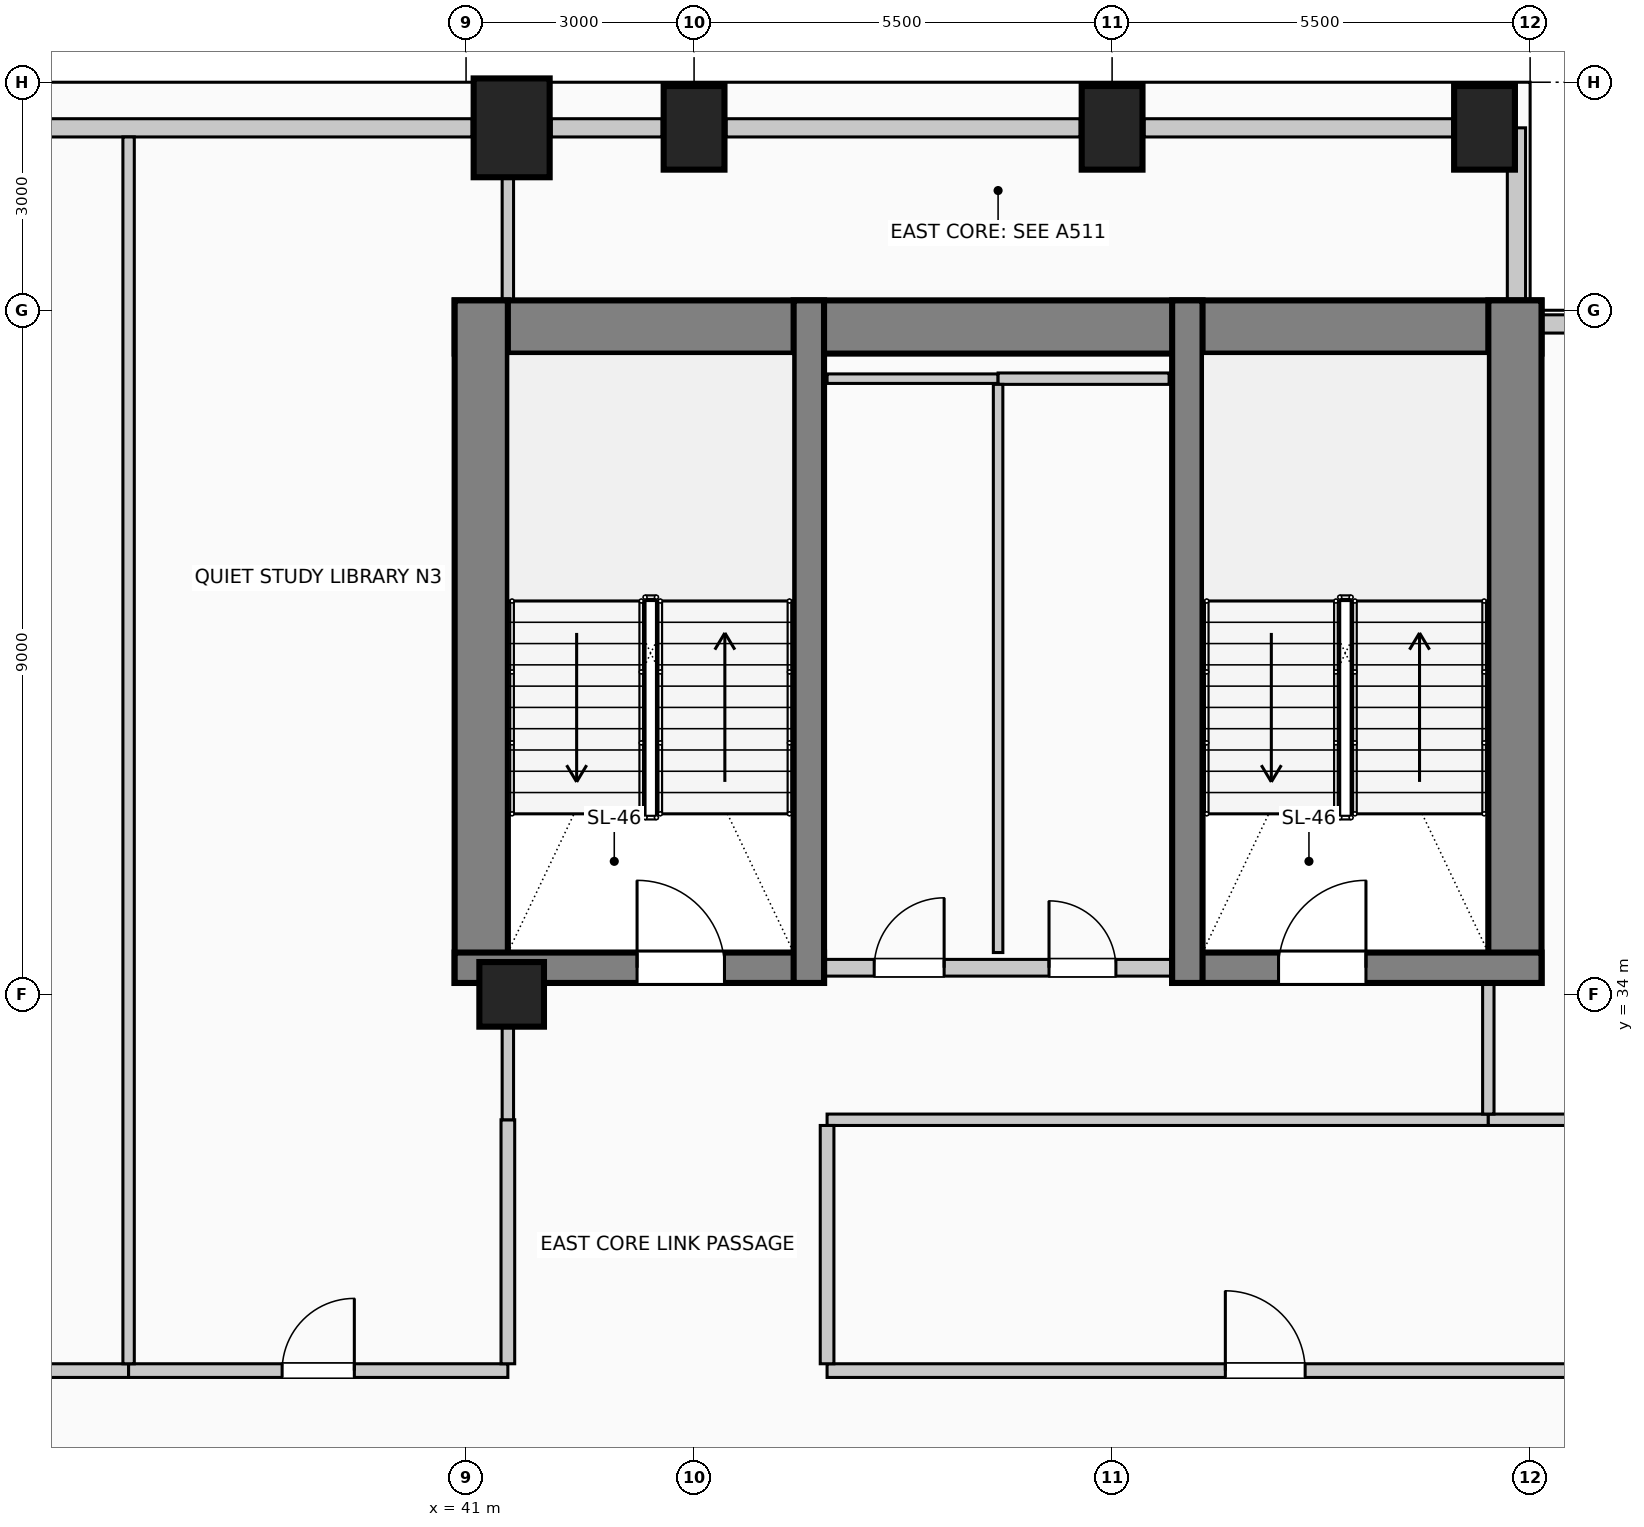
"""IFC4 building model, lengths in metres.
Left out: names, types, materials, properties, quantities, classifications, styles, units other than length and angle.
Written with IfcOpenShell. Run it as: python <this file> out.ifc"""

import sys

from ifc_helpers import new_model, si_unit, direction, frame, frame_2d, origin, origin_2d, place, context, subcontext, project, spatial, rectangle, circle, extrude, element, fill, save


model = new_model("IFC4")
c1 = context("Model", 3, precision=1e-05, world=origin(), true_north=direction((0.0, 1.0)))
c2 = subcontext(c1, "Body", "Model", "MODEL_VIEW")
j1 = project(units=[si_unit("LENGTHUNIT", "METRE"), si_unit("PLANEANGLEUNIT", "RADIAN")], contexts=[c1])
p1 = place(None, origin())
s1 = spatial("IfcSite", under=j1, at=p1, CompositionType="ELEMENT")
p2 = place(p1, origin())
s2 = spatial("IfcBuilding", under=s1, at=p2, CompositionType="ELEMENT")
p3 = place(p2, frame((0.0, 0.0, 218.6)))
s3 = spatial("IfcBuildingStorey", under=s2, at=p3, CompositionType="ELEMENT", Elevation=218.6)
p4 = place(p3, frame((40.85, 42.78, 0.0), z_axis=(0.0, 0.0, 1.0), x_axis=(1.0, 0.0, 0.0)))
e1 = element("IfcWall", 1, at=p4, inside=s3, PredefinedType="SHEAR", context=c2, shape_type="SweptSolid", body=[
    extrude(rectangle(XDim=14.3, YDim=0.7, at=frame_2d((7.15, 0.0))), origin(), (0.0, 0.0, 1.0), 4.0),
])
for number, where, z_axis, x_axis in (
    (2, (41.2, 34.15, 0.0), (0.0, 0.0, 1.0), (0.0, 1.0, 0.0)),
    (3, (54.8, 34.15, 0.0), (0.0, 0.0, 1.0), (0.0, 1.0, 0.0)),
):
    element("IfcWall", number, at=place(p3, frame(where, z_axis=z_axis, x_axis=x_axis)), inside=s3, PredefinedType="SHEAR", context=c2, shape_type="SweptSolid", body=[
        extrude(rectangle(XDim=8.98, YDim=0.7, at=frame_2d((4.49, 0.0))), origin(), (0.0, 0.0, 1.0), 4.0),
    ])
p5 = place(p3, frame((40.85, 34.35, 0.0), z_axis=(0.0, 0.0, 1.0), x_axis=(1.0, 0.0, 0.0)))
e4 = element("IfcWall", 4, at=p5, inside=s3, PredefinedType="SHEAR", context=c2, shape_type="SweptSolid", body=[
    extrude(rectangle(XDim=4.86, YDim=0.4, at=frame_2d((2.43, 0.0))), origin(), (0.0, 0.0, 1.0), 4.0),
])
p6 = place(p5, frame((2.4, 0.0, 0.0)))
e5 = element("IfcOpeningElement", 5, at=p6, cuts=e4, PredefinedType="OPENING", context=c2, shape_type="SweptSolid", body=[
    extrude(rectangle(XDim=1.15, YDim=2.2, at=frame_2d((0.575, 1.1))), frame((0.0, 0.21, 0.0), z_axis=(0.0, -1.0, 0.0), x_axis=(1.0, 0.0, 0.0)), (0.0, 0.0, 1.0), 0.42),
])
p7 = place(p3, frame((45.51, 34.15, 0.0), z_axis=(0.0, 0.0, 1.0), x_axis=(0.0, 1.0, 0.0)))
e6 = element("IfcWall", 6, at=p7, inside=s3, PredefinedType="SHEAR", context=c2, shape_type="SweptSolid", body=[
    extrude(rectangle(XDim=8.98, YDim=0.4, at=frame_2d((4.49, 0.0))), origin(), (0.0, 0.0, 1.0), 4.0),
])
p8 = place(p3, frame((50.29, 34.35, 0.0), z_axis=(0.0, 0.0, 1.0), x_axis=(1.0, 0.0, 0.0)))
e7 = element("IfcWall", 7, at=p8, inside=s3, PredefinedType="SHEAR", context=c2, shape_type="SweptSolid", body=[
    extrude(rectangle(XDim=4.86, YDim=0.4, at=frame_2d((2.43, 0.0))), origin(), (0.0, 0.0, 1.0), 4.0),
])
p9 = place(p8, frame((1.4, 0.0, 0.0)))
e8 = element("IfcOpeningElement", 8, at=p9, cuts=e7, PredefinedType="OPENING", context=c2, shape_type="SweptSolid", body=[
    extrude(rectangle(XDim=1.15, YDim=2.2, at=frame_2d((0.575, 1.1))), frame((0.0, 0.21, 0.0), z_axis=(0.0, -1.0, 0.0), x_axis=(1.0, 0.0, 0.0)), (0.0, 0.0, 1.0), 0.42),
])
p10 = place(p3, frame((50.49, 34.15, 0.0), z_axis=(0.0, 0.0, 1.0), x_axis=(0.0, 1.0, 0.0)))
e9 = element("IfcWall", 9, at=p10, inside=s3, PredefinedType="SHEAR", context=c2, shape_type="SweptSolid", body=[
    extrude(rectangle(XDim=8.98, YDim=0.4, at=frame_2d((4.49, 0.0))), origin(), (0.0, 0.0, 1.0), 4.0),
])
p11 = place(p3, frame((41.6, 45.4, 0.0), z_axis=(0.0, 0.0, 1.0), x_axis=(1.0, 0.0, 0.0)))
e10 = element("IfcColumn", 10, at=p11, inside=s3, PredefinedType="COLUMN", context=c2, shape_type="SweptSolid", body=[
    extrude(rectangle(XDim=1.0, YDim=1.3, at=origin_2d()), origin(), (0.0, 0.0, 1.0), 4.0),
])
for number, where, z_axis, x_axis in (
    (11, (44.0, 45.4, 0.0), (0.0, 0.0, 1.0), (1.0, 0.0, 0.0)),
    (12, (49.5, 45.4, 0.0), (0.0, 0.0, 1.0), (1.0, 0.0, 0.0)),
    (13, (54.4, 45.4, 0.0), (0.0, 0.0, 1.0), (1.0, 0.0, 0.0)),
):
    element("IfcColumn", number, at=place(p3, frame(where, z_axis=z_axis, x_axis=x_axis)), inside=s3, PredefinedType="COLUMN", context=c2, shape_type="SweptSolid", body=[
        extrude(rectangle(XDim=0.8, YDim=1.1, at=origin_2d()), origin(), (0.0, 0.0, 1.0), 4.0),
    ])
p12 = place(p3, frame((41.6, 34.0, 0.0), z_axis=(0.0, 0.0, 1.0), x_axis=(1.0, 0.0, 0.0)))
e14 = element("IfcColumn", 14, at=p12, inside=s3, PredefinedType="COLUMN", context=c2, shape_type="SweptSolid", body=[
    extrude(circle(Radius=0.425, at=origin_2d()), origin(), (0.0, 0.0, 1.0), 4.0),
])
p13 = place(p3, frame((34.52, 45.4, 0.0), z_axis=(0.0, 0.0, 1.0), x_axis=(1.0, 0.0, 0.0)))
e15 = element("IfcWall", 15, at=p13, inside=s3, PredefinedType="SOLIDWALL", context=c2, shape_type="SweptSolid", body=[
    extrude(rectangle(XDim=6.56, YDim=0.24, at=frame_2d((3.28, 0.0))), origin(), (0.0, 0.0, 1.0), 3.0),
])
p14 = place(p3, frame((42.12, 45.4, 0.0), z_axis=(0.0, 0.0, 1.0), x_axis=(1.0, 0.0, 0.0)))
e16 = element("IfcWall", 16, at=p14, inside=s3, PredefinedType="SOLIDWALL", context=c2, shape_type="SweptSolid", body=[
    extrude(rectangle(XDim=1.46, YDim=0.24, at=frame_2d((0.73, 0.0))), origin(), (0.0, 0.0, 1.0), 3.0),
])
p15 = place(p3, frame((44.42, 45.4, 0.0), z_axis=(0.0, 0.0, 1.0), x_axis=(1.0, 0.0, 0.0)))
e17 = element("IfcWall", 17, at=p15, inside=s3, PredefinedType="SOLIDWALL", context=c2, shape_type="SweptSolid", body=[
    extrude(rectangle(XDim=4.66, YDim=0.24, at=frame_2d((2.33, 0.0))), origin(), (0.0, 0.0, 1.0), 3.0),
])
p16 = place(p3, frame((49.92, 45.4, 0.0), z_axis=(0.0, 0.0, 1.0), x_axis=(1.0, 0.0, 0.0)))
e18 = element("IfcWall", 18, at=p16, inside=s3, PredefinedType="SOLIDWALL", context=c2, shape_type="SweptSolid", body=[
    extrude(rectangle(XDim=4.06, YDim=0.24, at=frame_2d((2.03, 0.0))), origin(), (0.0, 0.0, 1.0), 3.0),
])
p17 = place(p3, frame((54.82, 45.4, 0.0), z_axis=(0.0, 0.0, 1.0), x_axis=(0.0, -1.0, 0.0)))
e19 = element("IfcWall", 19, at=p17, inside=s3, PredefinedType="SOLIDWALL", context=c2, shape_type="SweptSolid", body=[
    extrude(rectangle(XDim=2.265, YDim=0.24, at=frame_2d((1.132, 0.0))), origin(), (0.0, 0.0, 1.0), 3.75),
])
p18 = place(p3, frame((55.155, 42.82, 0.0), z_axis=(0.0, 0.0, 1.0), x_axis=(1.0, 0.0, 0.0)))
e20 = element("IfcWall", 20, at=p18, inside=s3, PredefinedType="SOLIDWALL", context=c2, shape_type="SweptSolid", body=[
    extrude(rectangle(XDim=2.245, YDim=0.24, at=frame_2d((1.123, 0.0))), origin(), (0.0, 0.0, 1.0), 3.75),
])
p19 = place(p3, frame((45.72, 34.35, 0.0), z_axis=(0.0, 0.0, 1.0), x_axis=(1.0, 0.0, 0.0)))
e21 = element("IfcWall", 21, at=p19, inside=s3, PredefinedType="PARTITIONING", context=c2, shape_type="SweptSolid", body=[
    extrude(rectangle(XDim=4.56, YDim=0.22, at=frame_2d((2.28, 0.0))), origin(), (0.0, 0.0, 1.0), 3.75),
])
p20 = place(p19, frame((0.65, 0.0, 0.0)))
e22 = element("IfcOpeningElement", 22, at=p20, cuts=e21, PredefinedType="OPENING", context=c2, shape_type="SweptSolid", body=[
    extrude(rectangle(XDim=0.92, YDim=2.1, at=frame_2d((0.46, 1.05))), frame((0.0, 0.12, 0.0), z_axis=(0.0, -1.0, 0.0), x_axis=(1.0, 0.0, 0.0)), (0.0, 0.0, 1.0), 0.24),
])
p21 = place(p19, frame((2.95, 0.0, 0.0)))
e23 = element("IfcOpeningElement", 23, at=p21, cuts=e21, PredefinedType="OPENING", context=c2, shape_type="SweptSolid", body=[
    extrude(rectangle(XDim=0.88, YDim=2.1, at=frame_2d((0.44, 1.05))), frame((0.0, 0.12, 0.0), z_axis=(0.0, -1.0, 0.0), x_axis=(1.0, 0.0, 0.0)), (0.0, 0.0, 1.0), 0.24),
])
p22 = place(p3, frame((28.09, 29.05, 0.0), z_axis=(0.0, 0.0, 1.0), x_axis=(1.0, 0.0, 0.0)))
e24 = element("IfcWall", 24, at=p22, inside=s3, PredefinedType="PARTITIONING", context=c2, shape_type="SweptSolid", body=[
    extrude(rectangle(XDim=8.47, YDim=0.18, at=frame_2d((4.235, 0.0))), origin(), (0.0, 0.0, 1.0), 3.75),
])
p23 = place(p22, frame((3.71, 0.0, 0.0)))
e25 = element("IfcOpeningElement", 25, at=p23, cuts=e24, PredefinedType="OPENING", context=c2, shape_type="SweptSolid", body=[
    extrude(rectangle(XDim=1.05, YDim=2.15, at=frame_2d((0.525, 1.075))), frame((0.0, 0.1, 0.0), z_axis=(0.0, -1.0, 0.0), x_axis=(1.0, 0.0, 0.0)), (0.0, 0.0, 1.0), 0.2),
])
p24 = place(p3, frame((36.56, 29.05, 0.0), z_axis=(0.0, 0.0, 1.0), x_axis=(1.0, 0.0, 0.0)))
e26 = element("IfcWall", 26, at=p24, inside=s3, PredefinedType="PARTITIONING", context=c2, shape_type="SweptSolid", body=[
    extrude(rectangle(XDim=4.99, YDim=0.18, at=frame_2d((2.495, 0.0))), origin(), (0.0, 0.0, 1.0), 3.75),
])
p25 = place(p24, frame((2.02, 0.0, 0.0)))
e27 = element("IfcOpeningElement", 27, at=p25, cuts=e26, PredefinedType="OPENING", context=c2, shape_type="SweptSolid", body=[
    extrude(rectangle(XDim=0.95, YDim=2.15, at=frame_2d((0.475, 1.075))), frame((0.0, 0.1, 0.0), z_axis=(0.0, -1.0, 0.0), x_axis=(1.0, 0.0, 0.0)), (0.0, 0.0, 1.0), 0.2),
])
p26 = place(p3, frame((45.75, 29.05, 0.0), z_axis=(0.0, 0.0, 1.0), x_axis=(1.0, 0.0, 0.0)))
e28 = element("IfcWall", 28, at=p26, inside=s3, PredefinedType="PARTITIONING", context=c2, shape_type="SweptSolid", body=[
    extrude(rectangle(XDim=11.53, YDim=0.18, at=frame_2d((5.765, 0.0))), origin(), (0.0, 0.0, 1.0), 3.75),
])
p27 = place(p26, frame((5.24, 0.0, 0.0)))
e29 = element("IfcOpeningElement", 29, at=p27, cuts=e28, PredefinedType="OPENING", context=c2, shape_type="SweptSolid", body=[
    extrude(rectangle(XDim=1.05, YDim=2.15, at=frame_2d((0.525, 1.075))), frame((0.0, 0.1, 0.0), z_axis=(0.0, -1.0, 0.0), x_axis=(1.0, 0.0, 0.0)), (0.0, 0.0, 1.0), 0.2),
])
p28 = place(p3, frame((45.75, 32.35, 0.0), z_axis=(0.0, 0.0, 1.0), x_axis=(1.0, 0.0, 0.0)))
e30 = element("IfcWall", 30, at=p28, inside=s3, PredefinedType="PARTITIONING", context=c2, shape_type="SweptSolid", body=[
    extrude(rectangle(XDim=8.7, YDim=0.15, at=frame_2d((4.35, 0.0))), origin(), (0.0, 0.0, 1.0), 3.75),
])
p29 = place(p3, frame((54.45, 32.35, 0.0), z_axis=(0.0, 0.0, 1.0), x_axis=(1.0, 0.0, 0.0)))
e31 = element("IfcWall", 31, at=p29, inside=s3, PredefinedType="PARTITIONING", context=c2, shape_type="SweptSolid", body=[
    extrude(rectangle(XDim=2.83, YDim=0.15, at=frame_2d((1.415, 0.0))), origin(), (0.0, 0.0, 1.0), 3.75),
])
p30 = place(p3, frame((45.75, 42.1, 0.0), z_axis=(0.0, 0.0, 1.0), x_axis=(1.0, 0.0, 0.0)))
e32 = element("IfcWall", 32, at=p30, inside=s3, PredefinedType="PARTITIONING", context=c2, shape_type="SweptSolid", body=[
    extrude(rectangle(XDim=2.25, YDim=0.125, at=frame_2d((1.125, 0.0))), origin(), (0.0, 0.0, 1.0), 3.75),
])
p31 = place(p3, frame((48.0, 42.1, 0.0), z_axis=(0.0, 0.0, 1.0), x_axis=(1.0, 0.0, 0.0)))
e33 = element("IfcWall", 33, at=p31, inside=s3, PredefinedType="PARTITIONING", context=c2, shape_type="SweptSolid", body=[
    extrude(rectangle(XDim=2.25, YDim=0.15, at=frame_2d((1.125, 0.0))), origin(), (0.0, 0.0, 1.0), 3.75),
])
p32 = place(p3, frame((36.56, 29.14, 0.0), z_axis=(0.0, 0.0, 1.0), x_axis=(0.0, 1.0, 0.0)))
e34 = element("IfcWall", 34, at=p32, inside=s3, PredefinedType="PARTITIONING", context=c2, shape_type="SweptSolid", body=[
    extrude(rectangle(XDim=16.14, YDim=0.15, at=frame_2d((8.07, 0.0))), origin(), (0.0, 0.0, 1.0), 3.75),
])
p33 = place(p3, frame((41.55, 29.14, 0.0), z_axis=(0.0, 0.0, 1.0), x_axis=(0.0, 1.0, 0.0)))
e35 = element("IfcWall", 35, at=p33, inside=s3, PredefinedType="PARTITIONING", context=c2, shape_type="SweptSolid", body=[
    extrude(rectangle(XDim=3.21, YDim=0.18, at=frame_2d((1.605, 0.0))), origin(), (0.0, 0.0, 1.0), 3.145),
])
p34 = place(p3, frame((41.55, 32.35, 0.0), z_axis=(0.0, 0.0, 1.0), x_axis=(0.0, 1.0, 0.0)))
e36 = element("IfcWall", 36, at=p34, inside=s3, PredefinedType="PARTITIONING", context=c2, shape_type="SweptSolid", body=[
    extrude(rectangle(XDim=1.225, YDim=0.15, at=frame_2d((0.612, 0.0))), origin(), (0.0, 0.0, 1.0), 3.145),
])
p35 = place(p3, frame((41.55, 43.13, 0.0), z_axis=(0.0, 0.0, 1.0), x_axis=(0.0, 1.0, 0.0)))
e37 = element("IfcWall", 37, at=p35, inside=s3, PredefinedType="PARTITIONING", context=c2, shape_type="SweptSolid", body=[
    extrude(rectangle(XDim=1.62, YDim=0.15, at=frame_2d((0.81, 0.0))), origin(), (0.0, 0.0, 1.0), 3.75),
])
p36 = place(p3, frame((45.75, 29.14, 0.0), z_axis=(0.0, 0.0, 1.0), x_axis=(0.0, 1.0, 0.0)))
e38 = element("IfcWall", 38, at=p36, inside=s3, PredefinedType="PARTITIONING", context=c2, shape_type="SweptSolid", body=[
    extrude(rectangle(XDim=3.135, YDim=0.18, at=frame_2d((1.567, 0.0))), origin(), (0.0, 0.0, 1.0), 3.75),
])
p37 = place(p3, frame((48.0, 34.55, 0.0), z_axis=(0.0, 0.0, 1.0), x_axis=(0.0, 1.0, 0.0)))
e39 = element("IfcWall", 39, at=p37, inside=s3, PredefinedType="PARTITIONING", context=c2, shape_type="SweptSolid", body=[
    extrude(rectangle(XDim=7.475, YDim=0.125, at=frame_2d((3.737, 0.0))), origin(), (0.0, 0.0, 1.0), 3.75),
])
p38 = place(p3, frame((54.45, 32.425, 0.0), z_axis=(0.0, 0.0, 1.0), x_axis=(0.0, 1.0, 0.0)))
e40 = element("IfcWall", 40, at=p38, inside=s3, PredefinedType="PARTITIONING", context=c2, shape_type="SweptSolid", body=[
    extrude(rectangle(XDim=1.725, YDim=0.15, at=frame_2d((0.862, 0.0))), origin(), (0.0, 0.0, 1.0), 3.75),
])
p39 = place(p6, origin())
e41 = element("IfcDoor", 41, at=p39, inside=s3, OperationType="SINGLE_SWING_LEFT", PredefinedType="DOOR", context=c2, shape_type="SweptSolid", body=[
    extrude(rectangle(XDim=1.15, YDim=2.2, at=frame_2d((0.575, 1.1))), frame((0.0, 0.025, 0.0), z_axis=(0.0, -1.0, 0.0), x_axis=(1.0, 0.0, 0.0)), (0.0, 0.0, 1.0), 0.05),
])
fill(e5, e41)
p40 = place(p20, origin())
e42 = element("IfcDoor", 42, at=p40, inside=s3, OperationType="SINGLE_SWING_RIGHT", PredefinedType="DOOR", context=c2, shape_type="SweptSolid", body=[
    extrude(rectangle(XDim=0.92, YDim=2.1, at=frame_2d((0.46, 1.05))), frame((0.0, 0.025, 0.0), z_axis=(0.0, -1.0, 0.0), x_axis=(1.0, 0.0, 0.0)), (0.0, 0.0, 1.0), 0.05),
])
fill(e22, e42)
p41 = place(p21, origin())
e43 = element("IfcDoor", 43, at=p41, inside=s3, OperationType="SINGLE_SWING_LEFT", PredefinedType="DOOR", context=c2, shape_type="SweptSolid", body=[
    extrude(rectangle(XDim=0.88, YDim=2.1, at=frame_2d((0.44, 1.05))), frame((0.0, 0.025, 0.0), z_axis=(0.0, -1.0, 0.0), x_axis=(1.0, 0.0, 0.0)), (0.0, 0.0, 1.0), 0.05),
])
fill(e23, e43)
p42 = place(p9, origin())
e44 = element("IfcDoor", 44, at=p42, inside=s3, OperationType="SINGLE_SWING_RIGHT", PredefinedType="DOOR", context=c2, shape_type="SweptSolid", body=[
    extrude(rectangle(XDim=1.15, YDim=2.2, at=frame_2d((0.575, 1.1))), frame((0.0, 0.025, 0.0), z_axis=(0.0, -1.0, 0.0), x_axis=(1.0, 0.0, 0.0)), (0.0, 0.0, 1.0), 0.05),
])
fill(e8, e44)
p43 = place(p25, origin())
e45 = element("IfcDoor", 45, at=p43, inside=s3, OperationType="SINGLE_SWING_RIGHT", PredefinedType="DOOR", context=c2, shape_type="SweptSolid", body=[
    extrude(rectangle(XDim=0.95, YDim=2.15, at=frame_2d((0.475, 1.075))), frame((0.0, 0.025, 0.0), z_axis=(0.0, -1.0, 0.0), x_axis=(1.0, 0.0, 0.0)), (0.0, 0.0, 1.0), 0.05),
])
fill(e27, e45)
p44 = place(p27, origin())
e46 = element("IfcDoor", 46, at=p44, inside=s3, OperationType="SINGLE_SWING_LEFT", PredefinedType="DOOR", context=c2, shape_type="SweptSolid", body=[
    extrude(rectangle(XDim=1.05, YDim=2.15, at=frame_2d((0.525, 1.075))), frame((0.0, 0.025, 0.0), z_axis=(0.0, -1.0, 0.0), x_axis=(1.0, 0.0, 0.0)), (0.0, 0.0, 1.0), 0.05),
])
fill(e29, e46)
save(model, sys.argv[1])
